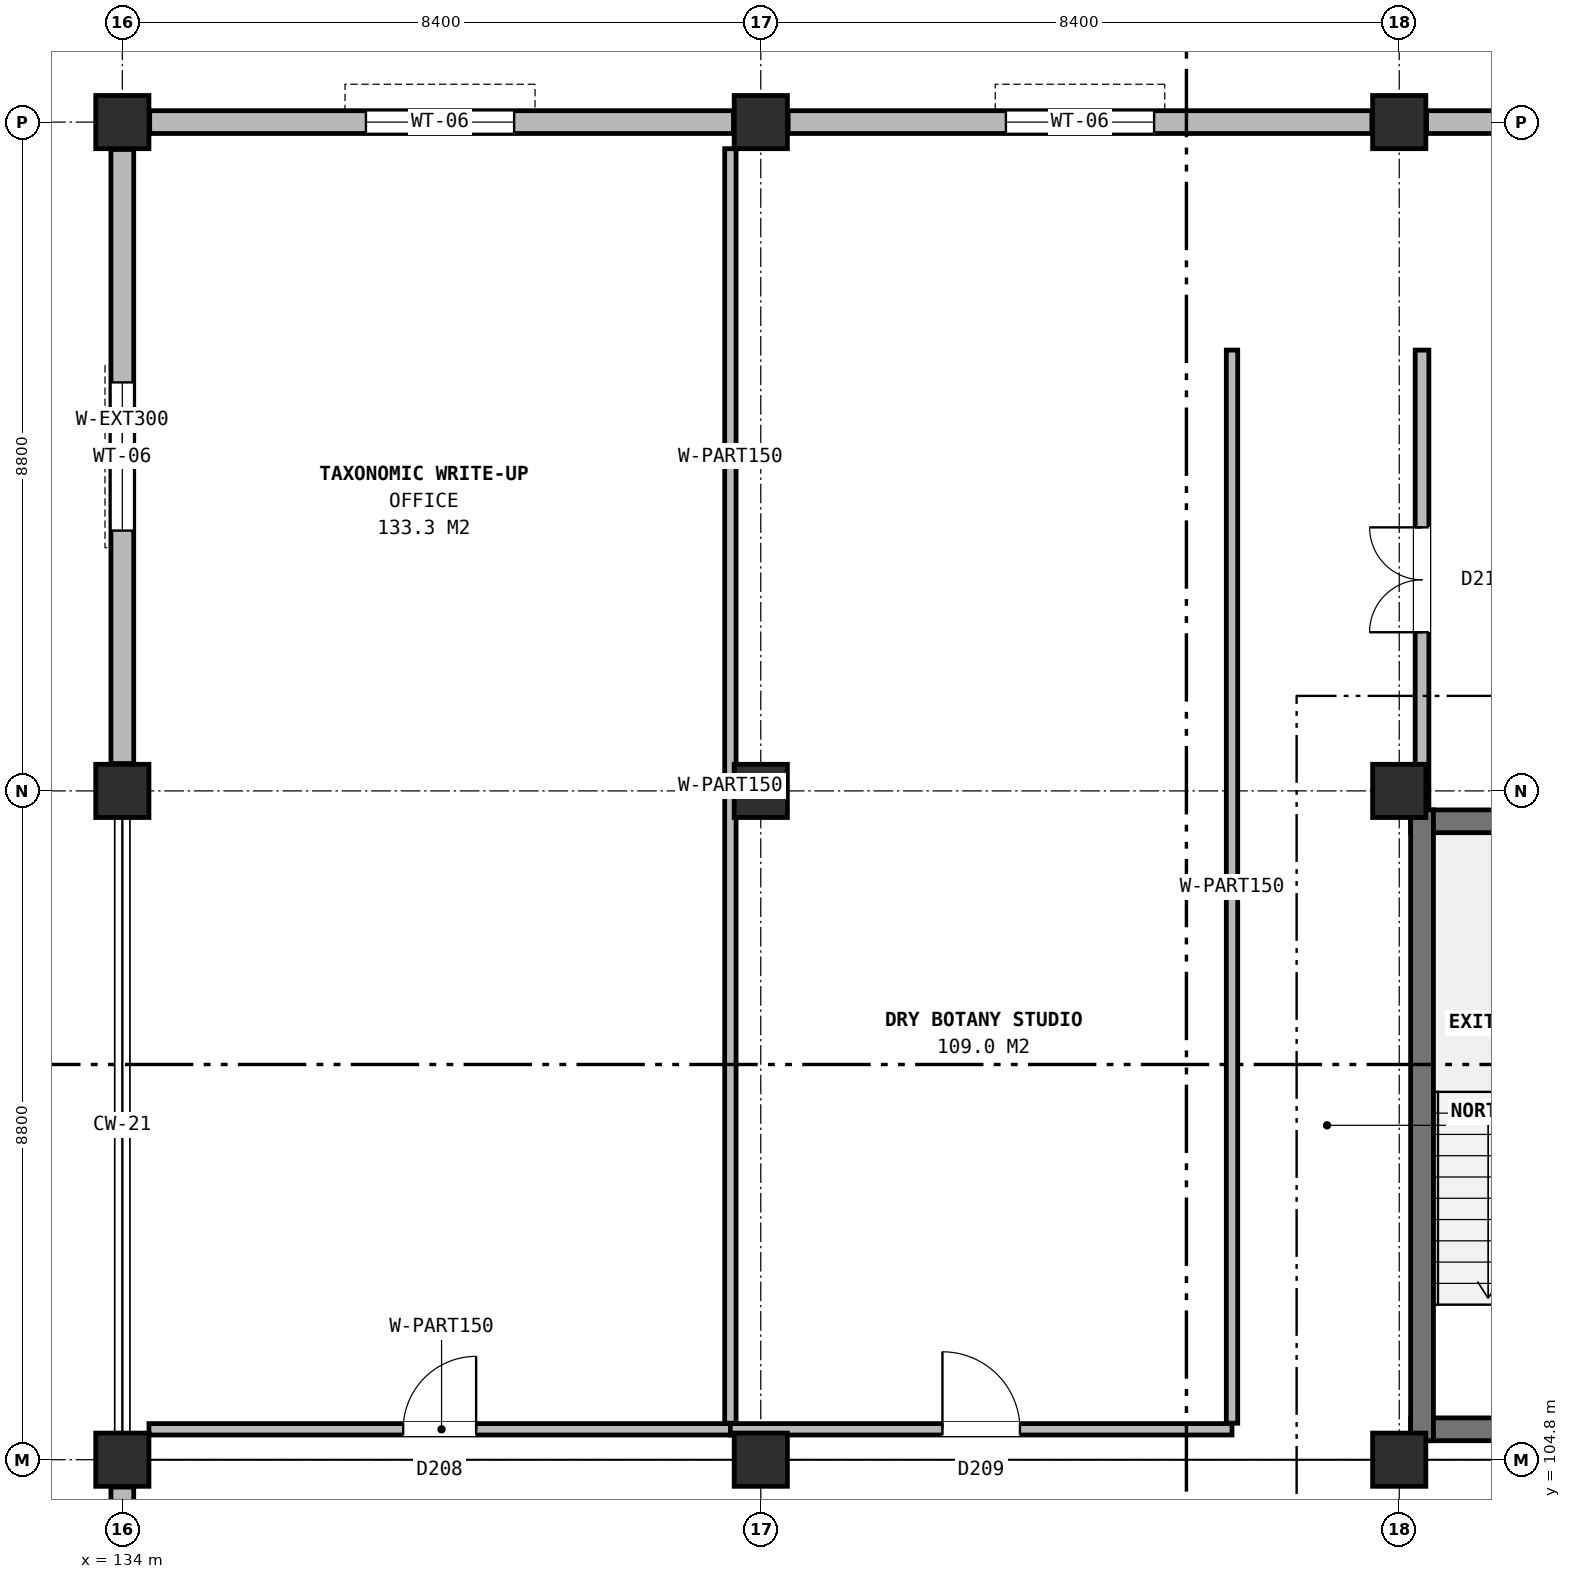
"""IFC4 building model, lengths in metres.
Left out: names, types, materials, properties, quantities, classifications, styles, units other than length and angle.
Written with IfcOpenShell. Run it as: python <this file> out.ifc"""

import sys

from ifc_helpers import new_model, si_unit, direction, frame, frame_2d, origin, origin_2d, place, context, subcontext, project, spatial, rectangle, extrude, element, fill, save


model = new_model("IFC4")
c1 = context("Model", 3, precision=1e-05, world=origin(), true_north=direction((0.0, 1.0)))
c2 = subcontext(c1, "Body", "Model", "MODEL_VIEW")
j1 = project(units=[si_unit("LENGTHUNIT", "METRE"), si_unit("PLANEANGLEUNIT", "RADIAN")], contexts=[c1])
p1 = place(None, origin())
s1 = spatial("IfcSite", under=j1, at=p1, CompositionType="ELEMENT")
p2 = place(p1, origin())
s2 = spatial("IfcBuilding", under=s1, at=p2, CompositionType="ELEMENT")
p3 = place(p2, frame((0.0, 0.0, 21.0)))
s3 = spatial("IfcBuildingStorey", under=s2, at=p3, CompositionType="ELEMENT", Elevation=21.0)
for number, where, z_axis, x_axis in (
    (1, (134.0, 104.8, 0.0), (0.0, 0.0, 1.0), (1.0, 0.0, 0.0)),
    (2, (134.0, 113.6, 0.0), (0.0, 0.0, 1.0), (1.0, 0.0, 0.0)),
    (3, (134.0, 122.4, 0.0), (0.0, 0.0, 1.0), (1.0, 0.0, 0.0)),
    (4, (142.4, 104.8, 0.0), (0.0, 0.0, 1.0), (1.0, 0.0, 0.0)),
    (5, (142.4, 113.6, 0.0), (0.0, 0.0, 1.0), (1.0, 0.0, 0.0)),
    (6, (142.4, 122.4, 0.0), (0.0, 0.0, 1.0), (1.0, 0.0, 0.0)),
    (7, (150.8, 104.8, 0.0), (0.0, 0.0, 1.0), (1.0, 0.0, 0.0)),
    (8, (150.8, 113.6, 0.0), (0.0, 0.0, 1.0), (1.0, 0.0, 0.0)),
    (9, (150.8, 122.4, 0.0), (0.0, 0.0, 1.0), (1.0, 0.0, 0.0)),
):
    element("IfcColumn", number, at=place(p3, frame(where, z_axis=z_axis, x_axis=x_axis)), inside=s3, PredefinedType="COLUMN", context=c2, shape_type="SweptSolid", body=[
        extrude(rectangle(XDim=0.7, YDim=0.7, at=origin_2d()), origin(), (0.0, 0.0, 1.0), 3.8),
    ])
p4 = place(p3, frame((158.84, 122.4, 0.0), z_axis=(0.0, 0.0, 1.0), x_axis=(-1.0, 0.0, 0.0)))
e10 = element("IfcWall", 10, at=p4, inside=s3, PredefinedType="SOLIDWALL", context=c2, shape_type="SweptSolid", body=[
    extrude(rectangle(XDim=7.68, YDim=0.3, at=frame_2d((3.84, 0.0))), origin(), (0.0, 0.0, 1.0), 2.95),
])
p5 = place(p4, frame((2.865, 0.0, 0.9)))
e11 = element("IfcOpeningElement", 11, at=p5, cuts=e10, PredefinedType="OPENING", context=c2, shape_type="SweptSolid", body=[
    extrude(rectangle(XDim=1.95, YDim=1.9, at=frame_2d((0.975, 0.95))), frame((0.0, 0.16, 0.0), z_axis=(0.0, -1.0, 0.0), x_axis=(1.0, 0.0, 0.0)), (0.0, 0.0, 1.0), 0.32),
])
p6 = place(p3, frame((150.44, 122.4, 0.0), z_axis=(0.0, 0.0, 1.0), x_axis=(-1.0, 0.0, 0.0)))
e12 = element("IfcWall", 12, at=p6, inside=s3, PredefinedType="SOLIDWALL", context=c2, shape_type="SweptSolid", body=[
    extrude(rectangle(XDim=7.68, YDim=0.3, at=frame_2d((3.84, 0.0))), origin(), (0.0, 0.0, 1.0), 2.95),
])
p7 = place(p6, frame((2.865, 0.0, 0.9)))
e13 = element("IfcOpeningElement", 13, at=p7, cuts=e12, PredefinedType="OPENING", context=c2, shape_type="SweptSolid", body=[
    extrude(rectangle(XDim=1.95, YDim=1.9, at=frame_2d((0.975, 0.95))), frame((0.0, 0.16, 0.0), z_axis=(0.0, -1.0, 0.0), x_axis=(1.0, 0.0, 0.0)), (0.0, 0.0, 1.0), 0.32),
])
p8 = place(p3, frame((142.04, 122.4, 0.0), z_axis=(0.0, 0.0, 1.0), x_axis=(-1.0, 0.0, 0.0)))
e14 = element("IfcWall", 14, at=p8, inside=s3, PredefinedType="SOLIDWALL", context=c2, shape_type="SweptSolid", body=[
    extrude(rectangle(XDim=7.68, YDim=0.3, at=frame_2d((3.84, 0.0))), origin(), (0.0, 0.0, 1.0), 2.95),
])
p9 = place(p8, frame((2.885, 0.0, 0.9)))
e15 = element("IfcOpeningElement", 15, at=p9, cuts=e14, PredefinedType="OPENING", context=c2, shape_type="SweptSolid", body=[
    extrude(rectangle(XDim=1.95, YDim=1.9, at=frame_2d((0.975, 0.95))), frame((0.0, 0.16, 0.0), z_axis=(0.0, -1.0, 0.0), x_axis=(1.0, 0.0, 0.0)), (0.0, 0.0, 1.0), 0.32),
])
p10 = place(p3, frame((134.0, 122.04, 0.0), z_axis=(0.0, 0.0, 1.0), x_axis=(0.0, -1.0, 0.0)))
e16 = element("IfcWall", 16, at=p10, inside=s3, PredefinedType="SOLIDWALL", context=c2, shape_type="SweptSolid", body=[
    extrude(rectangle(XDim=8.08, YDim=0.3, at=frame_2d((4.04, 0.0))), origin(), (0.0, 0.0, 1.0), 2.95),
])
p11 = place(p10, frame((3.065, 0.0, 0.9)))
e17 = element("IfcOpeningElement", 17, at=p11, cuts=e16, PredefinedType="OPENING", context=c2, shape_type="SweptSolid", body=[
    extrude(rectangle(XDim=1.95, YDim=1.9, at=frame_2d((0.975, 0.95))), frame((0.0, 0.16, 0.0), z_axis=(0.0, -1.0, 0.0), x_axis=(1.0, 0.0, 0.0)), (0.0, 0.0, 1.0), 0.32),
])
p12 = place(p3, frame((134.0, 104.44, 0.0), z_axis=(0.0, 0.0, 1.0), x_axis=(0.0, -1.0, 0.0)))
e18 = element("IfcWall", 18, at=p12, inside=s3, PredefinedType="SOLIDWALL", context=c2, shape_type="SweptSolid", body=[
    extrude(rectangle(XDim=8.08, YDim=0.3, at=frame_2d((4.04, 0.0))), origin(), (0.0, 0.0, 1.0), 2.95),
])
p13 = place(p12, frame((4.085, 0.0, 0.9)))
e19 = element("IfcOpeningElement", 19, at=p13, cuts=e18, PredefinedType="OPENING", context=c2, shape_type="SweptSolid", body=[
    extrude(rectangle(XDim=1.95, YDim=1.9, at=frame_2d((0.975, 0.95))), frame((0.0, 0.16, 0.0), z_axis=(0.0, -1.0, 0.0), x_axis=(1.0, 0.0, 0.0)), (0.0, 0.0, 1.0), 0.32),
])
for number, where, z_axis, x_axis in (
    (20, (150.95, 105.2, 0.0), (0.0, 0.0, 1.0), (1.0, 0.0, 0.0)),
    (21, (150.95, 113.2, 0.0), (0.0, 0.0, 1.0), (1.0, 0.0, 0.0)),
):
    element("IfcWall", number, at=place(p3, frame(where, z_axis=z_axis, x_axis=x_axis)), inside=s3, PredefinedType="SHEAR", context=c2, shape_type="SweptSolid", body=[
        extrude(rectangle(XDim=3.6, YDim=0.3, at=frame_2d((1.8, 0.0))), origin(), (0.0, 0.0, 1.0), 3.8),
    ])
p14 = place(p3, frame((151.1, 105.05, 0.0), z_axis=(0.0, 0.0, 1.0), x_axis=(0.0, 1.0, 0.0)))
e22 = element("IfcWall", 22, at=p14, inside=s3, PredefinedType="SHEAR", context=c2, shape_type="SweptSolid", body=[
    extrude(rectangle(XDim=8.3, YDim=0.3, at=frame_2d((4.15, 0.0))), origin(), (0.0, 0.0, 1.0), 3.8),
])
p15 = place(p3, frame((134.35, 105.2, 0.0), z_axis=(0.0, 0.0, 1.0), x_axis=(1.0, 0.0, 0.0)))
e23 = element("IfcWall", 23, at=p15, inside=s3, PredefinedType="PARTITIONING", context=c2, shape_type="SweptSolid", body=[
    extrude(rectangle(XDim=7.65, YDim=0.15, at=frame_2d((3.825, 0.0))), origin(), (0.0, 0.0, 1.0), 2.945),
])
p16 = place(p15, frame((3.345, 0.0, 0.0)))
e24 = element("IfcOpeningElement", 24, at=p16, cuts=e23, PredefinedType="OPENING", context=c2, shape_type="SweptSolid", body=[
    extrude(rectangle(XDim=0.96, YDim=2.14, at=frame_2d((0.48, 1.07))), frame((0.0, 0.085, 0.0), z_axis=(0.0, -1.0, 0.0), x_axis=(1.0, 0.0, 0.0)), (0.0, 0.0, 1.0), 0.17),
])
p17 = place(p3, frame((142.0, 105.2, 0.0), z_axis=(0.0, 0.0, 1.0), x_axis=(1.0, 0.0, 0.0)))
e25 = element("IfcWall", 25, at=p17, inside=s3, PredefinedType="PARTITIONING", context=c2, shape_type="SweptSolid", body=[
    extrude(rectangle(XDim=6.6, YDim=0.15, at=frame_2d((3.3, 0.0))), origin(), (0.0, 0.0, 1.0), 2.945),
])
p18 = place(p17, frame((2.79, 0.0, 0.0)))
e26 = element("IfcOpeningElement", 26, at=p18, cuts=e25, PredefinedType="OPENING", context=c2, shape_type="SweptSolid", body=[
    extrude(rectangle(XDim=1.02, YDim=2.16, at=frame_2d((0.51, 1.08))), frame((0.0, 0.085, 0.0), z_axis=(0.0, -1.0, 0.0), x_axis=(1.0, 0.0, 0.0)), (0.0, 0.0, 1.0), 0.17),
])
p19 = place(p3, frame((148.6, 105.28, 0.0), z_axis=(0.0, 0.0, 1.0), x_axis=(0.0, 1.0, 0.0)))
e27 = element("IfcWall", 27, at=p19, inside=s3, PredefinedType="PARTITIONING", context=c2, shape_type="SweptSolid", body=[
    extrude(rectangle(XDim=14.12, YDim=0.15, at=frame_2d((7.06, 0.0))), origin(), (0.0, 0.0, 1.0), 3.465),
])
p20 = place(p3, frame((151.1, 113.355, 0.0), z_axis=(0.0, 0.0, 1.0), x_axis=(0.0, 1.0, 0.0)))
e28 = element("IfcWall", 28, at=p20, inside=s3, PredefinedType="PARTITIONING", context=c2, shape_type="SweptSolid", body=[
    extrude(rectangle(XDim=6.045, YDim=0.18, at=frame_2d((3.022, 0.0))), origin(), (0.0, 0.0, 1.0), 2.945),
])
p21 = place(p20, frame((2.333, 0.0, 0.0)))
e29 = element("IfcOpeningElement", 29, at=p21, cuts=e28, PredefinedType="OPENING", context=c2, shape_type="SweptSolid", body=[
    extrude(rectangle(XDim=1.38, YDim=2.2, at=frame_2d((0.69, 1.1))), frame((0.0, 0.1, 0.0), z_axis=(0.0, -1.0, 0.0), x_axis=(1.0, 0.0, 0.0)), (0.0, 0.0, 1.0), 0.2),
])
p22 = place(p3, frame((142.0, 105.28, 0.0), z_axis=(0.0, 0.0, 1.0), x_axis=(0.0, 1.0, 0.0)))
e30 = element("IfcWall", 30, at=p22, inside=s3, PredefinedType="PARTITIONING", context=c2, shape_type="SweptSolid", body=[
    extrude(rectangle(XDim=16.77, YDim=0.15, at=frame_2d((8.385, 0.0))), origin(), (0.0, 0.0, 1.0), 2.945),
])
p23 = place(p7, origin())
e31 = element("IfcWindow", 31, at=p23, inside=s3, PartitioningType="SINGLE_PANEL", PredefinedType="WINDOW", context=c2, shape_type="SweptSolid", body=[
    extrude(rectangle(XDim=1.95, YDim=1.9, at=frame_2d((0.975, 0.95))), frame((0.0, 0.03, 0.0), z_axis=(0.0, -1.0, 0.0), x_axis=(1.0, 0.0, 0.0)), (0.0, 0.0, 1.0), 0.06),
])
fill(e13, e31)
p24 = place(p9, origin())
e32 = element("IfcWindow", 32, at=p24, inside=s3, PartitioningType="SINGLE_PANEL", PredefinedType="WINDOW", context=c2, shape_type="SweptSolid", body=[
    extrude(rectangle(XDim=1.95, YDim=1.9, at=frame_2d((0.975, 0.95))), frame((0.0, 0.03, 0.0), z_axis=(0.0, -1.0, 0.0), x_axis=(1.0, 0.0, 0.0)), (0.0, 0.0, 1.0), 0.06),
])
fill(e15, e32)
p25 = place(p11, origin())
e33 = element("IfcWindow", 33, at=p25, inside=s3, PartitioningType="SINGLE_PANEL", PredefinedType="WINDOW", context=c2, shape_type="SweptSolid", body=[
    extrude(rectangle(XDim=1.95, YDim=1.9, at=frame_2d((0.975, 0.95))), frame((0.0, 0.03, 0.0), z_axis=(0.0, -1.0, 0.0), x_axis=(1.0, 0.0, 0.0)), (0.0, 0.0, 1.0), 0.06),
])
fill(e17, e33)
p26 = place(p16, origin())
e34 = element("IfcDoor", 34, at=p26, inside=s3, OperationType="SINGLE_SWING_RIGHT", PredefinedType="DOOR", context=c2, shape_type="SweptSolid", body=[
    extrude(rectangle(XDim=0.96, YDim=2.14, at=frame_2d((0.48, 1.07))), frame((0.0, 0.025, 0.0), z_axis=(0.0, -1.0, 0.0), x_axis=(1.0, 0.0, 0.0)), (0.0, 0.0, 1.0), 0.05),
])
fill(e24, e34)
p27 = place(p18, origin())
e35 = element("IfcDoor", 35, at=p27, inside=s3, OperationType="SINGLE_SWING_LEFT", PredefinedType="DOOR", context=c2, shape_type="SweptSolid", body=[
    extrude(rectangle(XDim=1.02, YDim=2.16, at=frame_2d((0.51, 1.08))), frame((0.0, 0.025, 0.0), z_axis=(0.0, -1.0, 0.0), x_axis=(1.0, 0.0, 0.0)), (0.0, 0.0, 1.0), 0.05),
])
fill(e26, e35)
p28 = place(p21, origin())
e36 = element("IfcDoor", 36, at=p28, inside=s3, OperationType="DOUBLE_DOOR_SINGLE_SWING", PredefinedType="DOOR", context=c2, shape_type="SweptSolid", body=[
    extrude(rectangle(XDim=1.38, YDim=2.2, at=frame_2d((0.69, 1.1))), frame((0.0, 0.025, 0.0), z_axis=(0.0, -1.0, 0.0), x_axis=(1.0, 0.0, 0.0)), (0.0, 0.0, 1.0), 0.05),
])
fill(e29, e36)
save(model, sys.argv[1])
